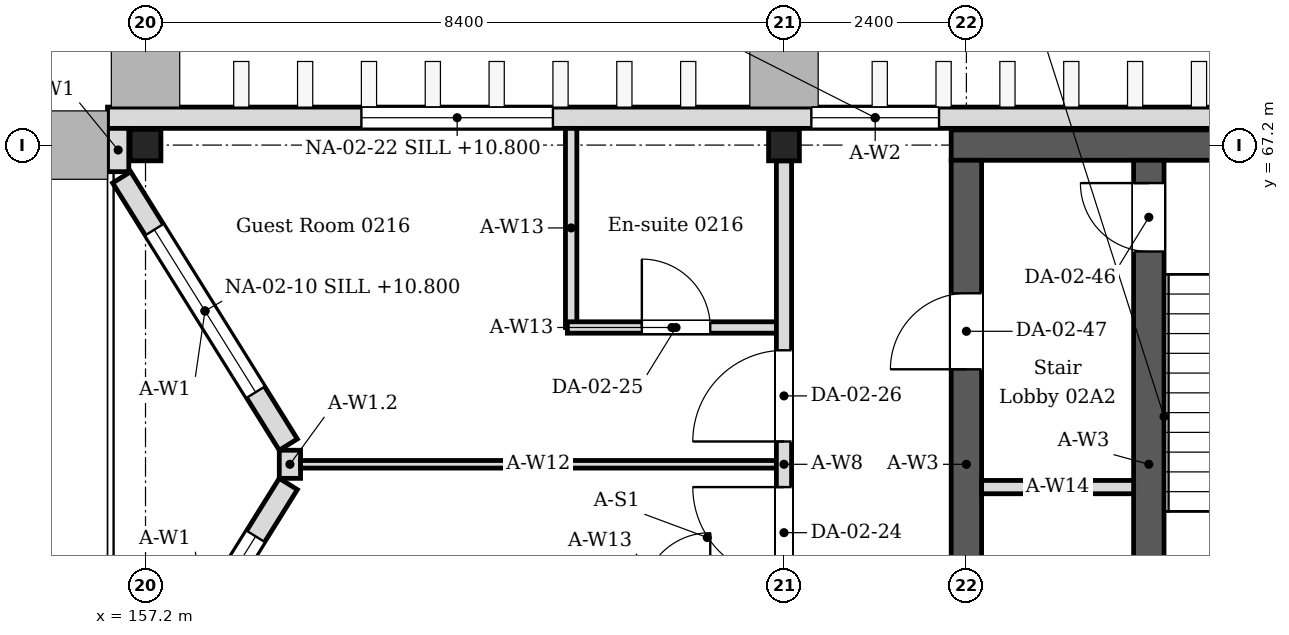
"""IFC4 building model, lengths in metres.
Left out: names, types, materials, properties, quantities, classifications, styles, units other than length and angle.
Written with IfcOpenShell. Run it as: python <this file> out.ifc"""

import sys

from ifc_helpers import new_model, si_unit, direction, frame, frame_2d, origin, origin_2d, place, context, subcontext, project, spatial, rectangle, i_section, extrude, element, fill, save


model = new_model("IFC4")
c1 = context("Model", 3, precision=1e-05, world=origin(), true_north=direction((0.0, 1.0)))
c2 = subcontext(c1, "Body", "Model", "MODEL_VIEW")
j1 = project(units=[si_unit("LENGTHUNIT", "METRE"), si_unit("PLANEANGLEUNIT", "RADIAN")], contexts=[c1])
p1 = place(None, origin())
s1 = spatial("IfcSite", under=j1, at=p1, CompositionType="ELEMENT")
p2 = place(p1, origin())
s2 = spatial("IfcBuilding", under=s1, at=p2, CompositionType="ELEMENT")
p3 = place(p2, frame((0.0, 0.0, 10.2)))
s3 = spatial("IfcBuildingStorey", under=s2, at=p3, CompositionType="ELEMENT", Elevation=10.2)
for number, where, z_axis, x_axis in (
    (1, (157.2, 67.2, 0.0), (0.0, 0.0, 1.0), (1.0, 0.0, 0.0)),
    (2, (165.6, 67.2, 0.0), (0.0, 0.0, 1.0), (1.0, 0.0, 0.0)),
):
    element("IfcColumn", number, at=place(p3, frame(where, z_axis=z_axis, x_axis=x_axis)), inside=s3, PredefinedType="COLUMN", context=c2, shape_type="SweptSolid", body=[
        extrude(i_section(OverallWidth=0.405, OverallDepth=0.414, WebThickness=0.018, FlangeThickness=0.028, FilletRadius=0.022, at=origin_2d()), origin(), (0.0, 0.0, 1.0), 4.2),
    ])
p4 = place(p3, frame((167.8, 67.2, 0.0), z_axis=(0.0, 0.0, 1.0), x_axis=(1.0, 0.0, 0.0)))
e3 = element("IfcWall", 3, at=p4, inside=s3, PredefinedType="SOLIDWALL", context=c2, shape_type="SweptSolid", body=[
    extrude(rectangle(XDim=8.8, YDim=0.4, at=frame_2d((4.4, 0.0))), origin(), (0.0, 0.0, 1.0), 4.05),
])
p5 = place(p3, frame((168.0, 59.0, 0.0), z_axis=(0.0, 0.0, 1.0), x_axis=(0.0, 1.0, 0.0)))
e4 = element("IfcWall", 4, at=p5, inside=s3, PredefinedType="SOLIDWALL", context=c2, shape_type="SweptSolid", body=[
    extrude(rectangle(XDim=8.0, YDim=0.4, at=frame_2d((4.0, 0.0))), origin(), (0.0, 0.0, 1.0), 4.05),
])
p6 = place(p5, frame((5.25, 0.0, 0.0)))
e5 = element("IfcOpeningElement", 5, at=p6, cuts=e4, PredefinedType="OPENING", context=c2, shape_type="SweptSolid", body=[
    extrude(rectangle(XDim=1.0, YDim=2.1, at=frame_2d((0.5, 1.05))), frame((0.0, 0.21, 0.0), z_axis=(0.0, -1.0, 0.0), x_axis=(1.0, 0.0, 0.0)), (0.0, 0.0, 1.0), 0.42),
])
p7 = place(p5, frame((1.275, 0.0, 0.0)))
e6 = element("IfcOpeningElement", 6, at=p7, cuts=e4, PredefinedType="OPENING", context=c2, shape_type="SweptSolid", body=[
    extrude(rectangle(XDim=1.05, YDim=2.1, at=frame_2d((0.525, 1.05))), frame((0.0, 0.21, 0.0), z_axis=(0.0, -1.0, 0.0), x_axis=(1.0, 0.0, 0.0)), (0.0, 0.0, 1.0), 0.42),
])
p8 = place(p3, frame((156.886, 59.224, 0.0), z_axis=(0.0, 0.0, 1.0), x_axis=(0.529018946142, 0.848610013271, 0.0)))
e7 = element("IfcWall", 7, at=p8, inside=s3, PredefinedType="SOLIDWALL", context=c2, shape_type="SweptSolid", body=[
    extrude(rectangle(XDim=4.144, YDim=0.28, at=frame_2d((2.072, 0.0))), origin(), (0.0, 0.0, 1.0), 4.05),
])
p9 = place(p8, frame((0.812, 0.0, 0.6)))
e8 = element("IfcOpeningElement", 8, at=p9, cuts=e7, PredefinedType="OPENING", context=c2, shape_type="SweptSolid", body=[
    extrude(rectangle(XDim=2.52, YDim=2.4, at=frame_2d((1.26, 1.2))), frame((0.0, 0.15, 0.0), z_axis=(0.0, -1.0, 0.0), x_axis=(1.0, 0.0, 0.0)), (0.0, 0.0, 1.0), 0.3),
])
p10 = place(p3, frame((159.079, 63.259, 0.0), z_axis=(0.0, 0.0, 1.0), x_axis=(-0.529018946142, 0.848610013271, 0.0)))
e9 = element("IfcWall", 9, at=p10, inside=s3, PredefinedType="SOLIDWALL", context=c2, shape_type="SweptSolid", body=[
    extrude(rectangle(XDim=4.144, YDim=0.28, at=frame_2d((2.072, 0.0))), origin(), (0.0, 0.0, 1.0), 4.05),
])
p11 = place(p10, frame((0.812, 0.0, 0.6)))
e10 = element("IfcOpeningElement", 10, at=p11, cuts=e9, PredefinedType="OPENING", context=c2, shape_type="SweptSolid", body=[
    extrude(rectangle(XDim=2.52, YDim=2.4, at=frame_2d((1.26, 1.2))), frame((0.0, 0.15, 0.0), z_axis=(0.0, -1.0, 0.0), x_axis=(1.0, 0.0, 0.0)), (0.0, 0.0, 1.0), 0.3),
])
p12 = place(p3, frame((159.1, 62.815, 0.0), z_axis=(0.0, 0.0, 1.0), x_axis=(0.0, 1.0, 0.0)))
e11 = element("IfcWall", 11, at=p12, inside=s3, PredefinedType="SOLIDWALL", context=c2, shape_type="SweptSolid", body=[
    extrude(rectangle(XDim=0.37, YDim=0.28, at=frame_2d((0.185, 0.0))), origin(), (0.0, 0.0, 1.0), 3.604),
])
p13 = place(p3, frame((156.84, 66.85, 0.0), z_axis=(0.0, 0.0, 1.0), x_axis=(0.0, 1.0, 0.0)))
e12 = element("IfcWall", 12, at=p13, inside=s3, PredefinedType="SOLIDWALL", context=c2, shape_type="SweptSolid", body=[
    extrude(rectangle(XDim=0.57, YDim=0.28, at=frame_2d((0.285, 0.0))), origin(), (0.0, 0.0, 1.0), 4.05),
])
p14 = place(p3, frame((156.7, 67.56, 0.0), z_axis=(0.0, 0.0, 1.0), x_axis=(1.0, 0.0, 0.0)))
e13 = element("IfcWall", 13, at=p14, inside=s3, PredefinedType="SOLIDWALL", context=c2, shape_type="SweptSolid", body=[
    extrude(rectangle(XDim=20.2, YDim=0.28, at=frame_2d((10.1, 0.0))), origin(), (0.0, 0.0, 1.0), 4.05),
])
p15 = place(p14, frame((9.26, 0.0, 0.6)))
e14 = element("IfcOpeningElement", 14, at=p15, cuts=e13, PredefinedType="OPENING", context=c2, shape_type="SweptSolid", body=[
    extrude(rectangle(XDim=1.68, YDim=2.4, at=frame_2d((0.84, 1.2))), frame((0.0, 0.15, 0.0), z_axis=(0.0, -1.0, 0.0), x_axis=(1.0, 0.0, 0.0)), (0.0, 0.0, 1.0), 0.3),
])
p16 = place(p14, frame((3.34, 0.0, 0.6)))
e15 = element("IfcOpeningElement", 15, at=p16, cuts=e13, PredefinedType="OPENING", context=c2, shape_type="SweptSolid", body=[
    extrude(rectangle(XDim=2.52, YDim=2.4, at=frame_2d((1.26, 1.2))), frame((0.0, 0.15, 0.0), z_axis=(0.0, -1.0, 0.0), x_axis=(1.0, 0.0, 0.0)), (0.0, 0.0, 1.0), 0.3),
])
p17 = place(p3, frame((162.8, 64.8, 0.0), z_axis=(0.0, 0.0, 1.0), x_axis=(0.0, 1.0, 0.0)))
e16 = element("IfcWall", 16, at=p17, inside=s3, PredefinedType="PARTITIONING", context=c2, shape_type="SweptSolid", body=[
    extrude(rectangle(XDim=2.62, YDim=0.15, at=frame_2d((1.31, 0.0))), origin(), (0.0, 0.0, 1.0), 4.05),
])
p18 = place(p3, frame((162.75, 64.8, 0.0), z_axis=(0.0, 0.0, 1.0), x_axis=(1.0, 0.0, 0.0)))
e17 = element("IfcWall", 17, at=p18, inside=s3, PredefinedType="PARTITIONING", context=c2, shape_type="SweptSolid", body=[
    extrude(rectangle(XDim=2.75, YDim=0.15, at=frame_2d((1.375, 0.0))), origin(), (0.0, 0.0, 1.0), 4.05),
])
p19 = place(p18, frame((0.98, 0.0, 0.0)))
e18 = element("IfcOpeningElement", 18, at=p19, cuts=e17, PredefinedType="OPENING", context=c2, shape_type="SweptSolid", body=[
    extrude(rectangle(XDim=0.9, YDim=2.1, at=frame_2d((0.45, 1.05))), frame((0.0, 0.085, 0.0), z_axis=(0.0, -1.0, 0.0), x_axis=(1.0, 0.0, 0.0)), (0.0, 0.0, 1.0), 0.17),
])
p20 = place(p3, frame((159.24, 63.0, 0.0), z_axis=(0.0, 0.0, 1.0), x_axis=(1.0, 0.0, 0.0)))
e19 = element("IfcWall", 19, at=p20, inside=s3, PredefinedType="PARTITIONING", context=c2, shape_type="SweptSolid", body=[
    extrude(rectangle(XDim=6.26, YDim=0.1, at=frame_2d((3.13, 0.0))), origin(), (0.0, 0.0, 1.0), 3.604),
])
p21 = place(p3, frame((165.6, 59.007, 0.0), z_axis=(0.0, 0.0, 1.0), x_axis=(0.0, 1.0, 0.0)))
e20 = element("IfcWall", 20, at=p21, inside=s3, PredefinedType="PARTITIONING", context=c2, shape_type="SweptSolid", body=[
    extrude(rectangle(XDim=7.986, YDim=0.2, at=frame_2d((3.993, 0.0))), origin(), (0.0, 0.0, 1.0), 3.45),
])
p22 = place(p21, frame((2.493, 0.0, 0.0)))
e21 = element("IfcOpeningElement", 21, at=p22, cuts=e20, PredefinedType="OPENING", context=c2, shape_type="SweptSolid", body=[
    extrude(rectangle(XDim=1.2, YDim=2.1, at=frame_2d((0.6, 1.05))), frame((0.0, 0.11, 0.0), z_axis=(0.0, -1.0, 0.0), x_axis=(1.0, 0.0, 0.0)), (0.0, 0.0, 1.0), 0.22),
])
p23 = place(p21, frame((4.293, 0.0, 0.0)))
e22 = element("IfcOpeningElement", 22, at=p23, cuts=e20, PredefinedType="OPENING", context=c2, shape_type="SweptSolid", body=[
    extrude(rectangle(XDim=1.2, YDim=2.1, at=frame_2d((0.6, 1.05))), frame((0.0, 0.11, 0.0), z_axis=(0.0, -1.0, 0.0), x_axis=(1.0, 0.0, 0.0)), (0.0, 0.0, 1.0), 0.22),
])
p24 = place(p3, frame((170.4, 59.0, 0.0), z_axis=(0.0, 0.0, 1.0), x_axis=(0.0, 1.0, 0.0)))
e23 = element("IfcWall", 23, at=p24, inside=s3, PredefinedType="SOLIDWALL", context=c2, shape_type="SweptSolid", body=[
    extrude(rectangle(XDim=8.0, YDim=0.4, at=frame_2d((4.0, 0.0))), origin(), (0.0, 0.0, 1.0), 4.05),
])
p25 = place(p24, frame((6.8, 0.0, 0.0)))
e24 = element("IfcOpeningElement", 24, at=p25, cuts=e23, PredefinedType="OPENING", context=c2, shape_type="SweptSolid", body=[
    extrude(rectangle(XDim=0.9, YDim=2.1, at=frame_2d((0.45, 1.05))), frame((0.0, 0.21, 0.0), z_axis=(0.0, -1.0, 0.0), x_axis=(1.0, 0.0, 0.0)), (0.0, 0.0, 1.0), 0.42),
])
p26 = place(p3, frame((168.2, 62.7, 0.0), z_axis=(0.0, 0.0, 1.0), x_axis=(1.0, 0.0, 0.0)))
e25 = element("IfcWall", 25, at=p26, inside=s3, PredefinedType="PARTITIONING", context=c2, shape_type="SweptSolid", body=[
    extrude(rectangle(XDim=2.0, YDim=0.175, at=frame_2d((1.0, 0.0))), origin(), (0.0, 0.0, 1.0), 4.05),
])
p27 = place(p9, origin())
e26 = element("IfcWindow", 26, at=p27, inside=s3, PartitioningType="SINGLE_PANEL", PredefinedType="WINDOW", context=c2, shape_type="SweptSolid", body=[
    extrude(rectangle(XDim=2.52, YDim=2.4, at=frame_2d((1.26, 1.2))), frame((0.0, 0.03, 0.0), z_axis=(0.0, -1.0, 0.0), x_axis=(1.0, 0.0, 0.0)), (0.0, 0.0, 1.0), 0.06),
])
fill(e8, e26)
p28 = place(p11, origin())
e27 = element("IfcWindow", 27, at=p28, inside=s3, PartitioningType="SINGLE_PANEL", PredefinedType="WINDOW", context=c2, shape_type="SweptSolid", body=[
    extrude(rectangle(XDim=2.52, YDim=2.4, at=frame_2d((1.26, 1.2))), frame((0.0, 0.03, 0.0), z_axis=(0.0, -1.0, 0.0), x_axis=(1.0, 0.0, 0.0)), (0.0, 0.0, 1.0), 0.06),
])
fill(e10, e27)
p29 = place(p15, origin())
e28 = element("IfcWindow", 28, at=p29, inside=s3, PartitioningType="SINGLE_PANEL", PredefinedType="WINDOW", context=c2, shape_type="SweptSolid", body=[
    extrude(rectangle(XDim=1.68, YDim=2.4, at=frame_2d((0.84, 1.2))), frame((0.0, 0.03, 0.0), z_axis=(0.0, -1.0, 0.0), x_axis=(1.0, 0.0, 0.0)), (0.0, 0.0, 1.0), 0.06),
])
fill(e14, e28)
p30 = place(p16, origin())
e29 = element("IfcWindow", 29, at=p30, inside=s3, PartitioningType="SINGLE_PANEL", PredefinedType="WINDOW", context=c2, shape_type="SweptSolid", body=[
    extrude(rectangle(XDim=2.52, YDim=2.4, at=frame_2d((1.26, 1.2))), frame((0.0, 0.03, 0.0), z_axis=(0.0, -1.0, 0.0), x_axis=(1.0, 0.0, 0.0)), (0.0, 0.0, 1.0), 0.06),
])
fill(e15, e29)
p31 = place(p22, origin())
e30 = element("IfcDoor", 30, at=p31, inside=s3, OperationType="SINGLE_SWING_RIGHT", PredefinedType="DOOR", context=c2, shape_type="SweptSolid", body=[
    extrude(rectangle(XDim=1.2, YDim=2.1, at=frame_2d((0.6, 1.05))), frame((0.0, 0.025, 0.0), z_axis=(0.0, -1.0, 0.0), x_axis=(1.0, 0.0, 0.0)), (0.0, 0.0, 1.0), 0.05),
])
fill(e21, e30)
p32 = place(p19, origin())
e31 = element("IfcDoor", 31, at=p32, inside=s3, OperationType="SINGLE_SWING_LEFT", PredefinedType="DOOR", context=c2, shape_type="SweptSolid", body=[
    extrude(rectangle(XDim=0.9, YDim=2.1, at=frame_2d((0.45, 1.05))), frame((0.0, 0.025, 0.0), z_axis=(0.0, -1.0, 0.0), x_axis=(1.0, 0.0, 0.0)), (0.0, 0.0, 1.0), 0.05),
])
fill(e18, e31)
p33 = place(p23, origin())
e32 = element("IfcDoor", 32, at=p33, inside=s3, OperationType="SINGLE_SWING_LEFT", PredefinedType="DOOR", context=c2, shape_type="SweptSolid", body=[
    extrude(rectangle(XDim=1.2, YDim=2.1, at=frame_2d((0.6, 1.05))), frame((0.0, 0.025, 0.0), z_axis=(0.0, -1.0, 0.0), x_axis=(1.0, 0.0, 0.0)), (0.0, 0.0, 1.0), 0.05),
])
fill(e22, e32)
p34 = place(p25, origin())
e33 = element("IfcDoor", 33, at=p34, inside=s3, OperationType="SINGLE_SWING_RIGHT", PredefinedType="DOOR", context=c2, shape_type="SweptSolid", body=[
    extrude(rectangle(XDim=0.9, YDim=2.1, at=frame_2d((0.45, 1.05))), frame((0.0, 0.025, 0.0), z_axis=(0.0, -1.0, 0.0), x_axis=(1.0, 0.0, 0.0)), (0.0, 0.0, 1.0), 0.05),
])
fill(e24, e33)
p35 = place(p6, origin())
e34 = element("IfcDoor", 34, at=p35, inside=s3, OperationType="SINGLE_SWING_LEFT", PredefinedType="DOOR", context=c2, shape_type="SweptSolid", body=[
    extrude(rectangle(XDim=1.0, YDim=2.1, at=frame_2d((0.5, 1.05))), frame((0.0, 0.025, 0.0), z_axis=(0.0, -1.0, 0.0), x_axis=(1.0, 0.0, 0.0)), (0.0, 0.0, 1.0), 0.05),
])
fill(e5, e34)
save(model, sys.argv[1])
